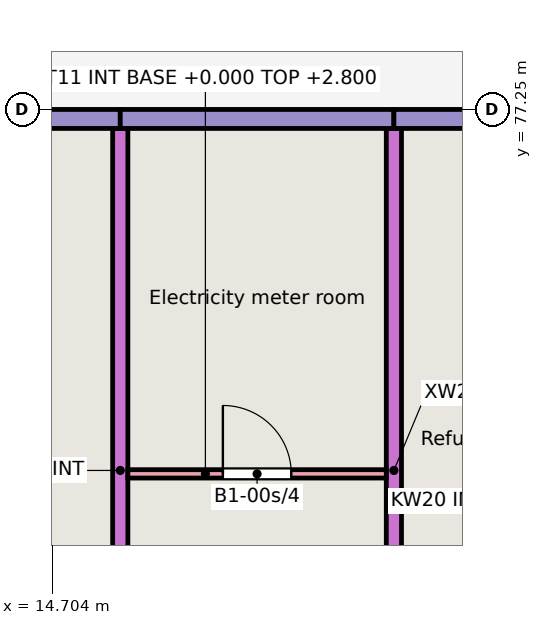
"""IFC4 building model, lengths in metres.
Left out: names, types, materials, properties, quantities, classifications, styles, units other than length and angle.
Written with IfcOpenShell. Run it as: python <this file> out.ifc"""

import sys

from ifc_helpers import new_model, si_unit, direction, frame, frame_2d, origin, place, context, subcontext, project, spatial, rectangle, extrude, element, fill, save


model = new_model("IFC4")
c1 = context("Model", 3, precision=1e-05, world=origin(), true_north=direction((0.0, 1.0)))
c2 = subcontext(c1, "Body", "Model", "MODEL_VIEW")
j1 = project(units=[si_unit("LENGTHUNIT", "METRE"), si_unit("PLANEANGLEUNIT", "RADIAN")], contexts=[c1])
p1 = place(None, origin())
s1 = spatial("IfcSite", under=j1, at=p1, CompositionType="ELEMENT")
p2 = place(p1, origin())
s2 = spatial("IfcBuilding", under=s1, at=p2, CompositionType="ELEMENT")
p3 = place(p2, origin())
s3 = spatial("IfcBuildingStorey", under=s2, at=p3, CompositionType="ELEMENT", Elevation=0.0)
for number, where, z_axis, x_axis in (
    (1, (15.6, 68.0, -0.25), (0.0, 0.0, 1.0), (0.0, 1.0, 0.0)),
    (2, (19.2, 68.0, -0.25), (0.0, 0.0, 1.0), (0.0, 1.0, 0.0)),
):
    element("IfcWall", number, at=place(p3, frame(where, z_axis=z_axis, x_axis=x_axis)), inside=s3, PredefinedType="SHEAR", context=c2, shape_type="SweptSolid", body=[
        extrude(rectangle(XDim=9.0, YDim=0.2, at=frame_2d((4.5, 0.0))), origin(), (0.0, 0.0, 1.0), 3.25),
    ])
p4 = place(p3, frame((11.85, 77.125, -0.25), z_axis=(0.0, 0.0, 1.0), x_axis=(1.0, 0.0, 0.0)))
e3 = element("IfcWall", 3, at=p4, inside=s3, PredefinedType="SOLIDWALL", context=c2, shape_type="SweptSolid", body=[
    extrude(rectangle(XDim=3.75, YDim=0.25, at=frame_2d((1.875, 0.0))), origin(), (0.0, 0.0, 1.0), 3.25),
])
p5 = place(p4, frame((1.475, 0.0, 0.25)))
e4 = element("IfcOpeningElement", 4, at=p5, cuts=e3, PredefinedType="OPENING", context=c2, shape_type="SweptSolid", body=[
    extrude(rectangle(XDim=1.0, YDim=2.1, at=frame_2d((0.5, 1.05))), frame((0.0, 0.135, 0.0), z_axis=(0.0, -1.0, 0.0), x_axis=(1.0, 0.0, 0.0)), (0.0, 0.0, 1.0), 0.27),
])
p6 = place(p3, frame((15.6, 77.125, -0.25), z_axis=(0.0, 0.0, 1.0), x_axis=(1.0, 0.0, 0.0)))
e5 = element("IfcWall", 5, at=p6, inside=s3, PredefinedType="SOLIDWALL", context=c2, shape_type="SweptSolid", body=[
    extrude(rectangle(XDim=3.6, YDim=0.25, at=frame_2d((1.8, 0.0))), origin(), (0.0, 0.0, 1.0), 3.25),
])
p7 = place(p3, frame((19.2, 77.125, -0.25), z_axis=(0.0, 0.0, 1.0), x_axis=(1.0, 0.0, 0.0)))
e6 = element("IfcWall", 6, at=p7, inside=s3, PredefinedType="SOLIDWALL", context=c2, shape_type="SweptSolid", body=[
    extrude(rectangle(XDim=3.6, YDim=0.25, at=frame_2d((1.8, 0.0))), origin(), (0.0, 0.0, 1.0), 3.25),
])
p8 = place(p7, frame((1.288, 0.0, 0.25)))
e7 = element("IfcOpeningElement", 7, at=p8, cuts=e6, PredefinedType="OPENING", context=c2, shape_type="SweptSolid", body=[
    extrude(rectangle(XDim=1.0, YDim=2.1, at=frame_2d((0.5, 1.05))), frame((0.0, 0.135, 0.0), z_axis=(0.0, -1.0, 0.0), x_axis=(1.0, 0.0, 0.0)), (0.0, 0.0, 1.0), 0.27),
])
p9 = place(p3, frame((15.7, 72.455, 0.0), z_axis=(0.0, 0.0, 1.0), x_axis=(1.0, 0.0, 0.0)))
e8 = element("IfcWall", 8, at=p9, inside=s3, PredefinedType="PARTITIONING", context=c2, shape_type="SweptSolid", body=[
    extrude(rectangle(XDim=3.4, YDim=0.11, at=frame_2d((1.7, 0.0))), origin(), (0.0, 0.0, 1.0), 2.8),
])
p10 = place(p9, frame((1.25, 0.0, 0.0)))
e9 = element("IfcOpeningElement", 9, at=p10, cuts=e8, PredefinedType="OPENING", context=c2, shape_type="SweptSolid", body=[
    extrude(rectangle(XDim=0.9, YDim=2.1, at=frame_2d((0.45, 1.05))), frame((0.0, 0.065, 0.0), z_axis=(0.0, -1.0, 0.0), x_axis=(1.0, 0.0, 0.0)), (0.0, 0.0, 1.0), 0.13),
])
p11 = place(p10, origin())
e10 = element("IfcDoor", 10, at=p11, inside=s3, OperationType="SINGLE_SWING_LEFT", PredefinedType="DOOR", context=c2, shape_type="SweptSolid", body=[
    extrude(rectangle(XDim=0.9, YDim=2.1, at=frame_2d((0.45, 1.05))), frame((0.0, 0.025, 0.0), z_axis=(0.0, -1.0, 0.0), x_axis=(1.0, 0.0, 0.0)), (0.0, 0.0, 1.0), 0.05),
])
fill(e9, e10)
save(model, sys.argv[1])
